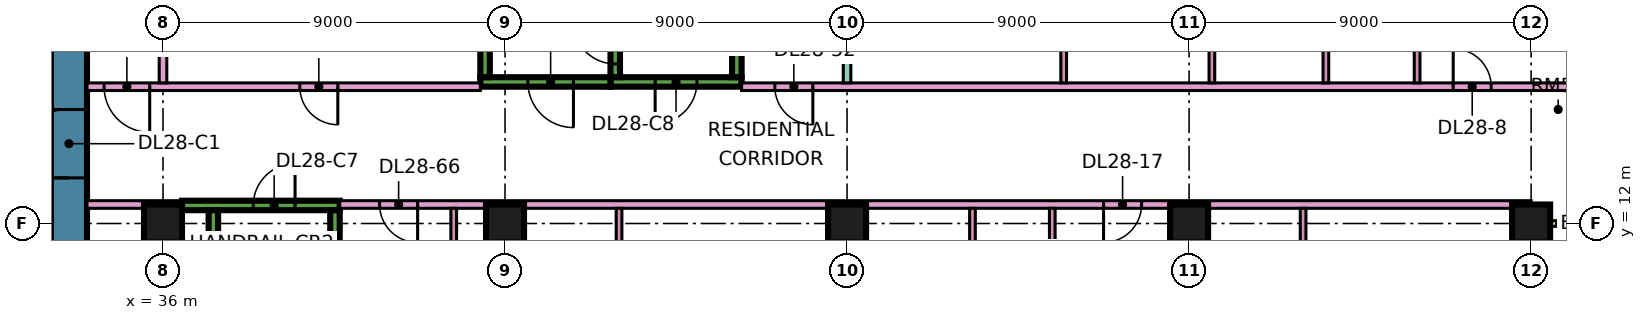
"""IFC4 building model, lengths in metres.
Left out: names, types, materials, properties, quantities, classifications, styles, units other than length and angle.
Written with IfcOpenShell. Run it as: python <this file> out.ifc"""

import sys

from ifc_helpers import new_model, si_unit, direction, frame, frame_2d, origin, origin_2d, place, context, subcontext, project, spatial, rectangle, extrude, element, fill, save


model = new_model("IFC4")
c1 = context("Model", 3, precision=1e-05, world=origin(), true_north=direction((0.0, 1.0)))
c2 = subcontext(c1, "Body", "Model", "MODEL_VIEW")
j1 = project(units=[si_unit("LENGTHUNIT", "METRE"), si_unit("PLANEANGLEUNIT", "RADIAN")], contexts=[c1])
p1 = place(None, origin())
s1 = spatial("IfcSite", under=j1, at=p1, CompositionType="ELEMENT")
p2 = place(p1, origin())
s2 = spatial("IfcBuilding", under=s1, at=p2, CompositionType="ELEMENT")
p3 = place(p2, frame((0.0, 0.0, 121.9)))
s3 = spatial("IfcBuildingStorey", under=s2, at=p3, CompositionType="ELEMENT", Elevation=121.9)
for number, where, z_axis, x_axis in (
    (1, (36.0, 12.0, 0.0), (0.0, 0.0, 1.0), (1.0, 0.0, 0.0)),
    (2, (45.0, 12.0, 0.0), (0.0, 0.0, 1.0), (1.0, 0.0, 0.0)),
    (3, (54.0, 12.0, 0.0), (0.0, 0.0, 1.0), (1.0, 0.0, 0.0)),
    (4, (63.0, 12.0, 0.0), (0.0, 0.0, 1.0), (1.0, 0.0, 0.0)),
    (5, (72.0, 12.0, 0.0), (0.0, 0.0, 1.0), (1.0, 0.0, 0.0)),
):
    element("IfcColumn", number, at=place(p3, frame(where, z_axis=z_axis, x_axis=x_axis)), inside=s3, PredefinedType="COLUMN", context=c2, shape_type="SweptSolid", body=[
        extrude(rectangle(XDim=1.0, YDim=1.0, at=origin_2d()), origin(), (0.0, 0.0, 1.0), 3.75),
    ])
p4 = place(p3, frame((33.525, 7.95, 0.0), z_axis=(0.0, 0.0, 1.0), x_axis=(0.0, 1.0, 0.0)))
e6 = element("IfcWall", 6, at=p4, inside=s3, PredefinedType="SHEAR", context=c2, shape_type="SweptSolid", body=[
    extrude(rectangle(XDim=11.1, YDim=0.95, at=frame_2d((5.55, 0.0))), origin(), (0.0, 0.0, 1.0), 3.75),
])
p5 = place(p4, frame((5.25, 0.0, 0.0)))
e7 = element("IfcOpeningElement", 7, at=p5, cuts=e6, PredefinedType="OPENING", context=c2, shape_type="SweptSolid", body=[
    extrude(rectangle(XDim=1.8, YDim=2.4, at=frame_2d((0.9, 1.2))), frame((0.0, 0.485, 0.0), z_axis=(0.0, -1.0, 0.0), x_axis=(1.0, 0.0, 0.0)), (0.0, 0.0, 1.0), 0.97),
])
p6 = place(p3, frame((36.5, 12.475, 0.0), z_axis=(0.0, 0.0, 1.0), x_axis=(1.0, 0.0, 0.0)))
e8 = element("IfcWall", 8, at=p6, inside=s3, PredefinedType="SHEAR", context=c2, shape_type="SweptSolid", body=[
    extrude(rectangle(XDim=4.15, YDim=0.25, at=frame_2d((2.075, 0.0))), origin(), (0.0, 0.0, 1.0), 3.75),
])
p7 = place(p6, frame((1.875, 0.0, 0.0)))
e9 = element("IfcOpeningElement", 9, at=p7, cuts=e8, PredefinedType="OPENING", context=c2, shape_type="SweptSolid", body=[
    extrude(rectangle(XDim=1.1, YDim=2.2, at=frame_2d((0.55, 1.1))), frame((0.0, 0.135, 0.0), z_axis=(0.0, -1.0, 0.0), x_axis=(1.0, 0.0, 0.0)), (0.0, 0.0, 1.0), 0.27),
])
for number, where, z_axis, x_axis in (
    (10, (37.325, 5.85, 0.0), (0.0, 0.0, 1.0), (0.0, 1.0, 0.0)),
    (11, (40.525, 5.85, 0.0), (0.0, 0.0, 1.0), (0.0, 1.0, 0.0)),
):
    element("IfcWall", number, at=place(p3, frame(where, z_axis=z_axis, x_axis=x_axis)), inside=s3, PredefinedType="SHEAR", context=c2, shape_type="SweptSolid", body=[
        extrude(rectangle(XDim=6.5, YDim=0.25, at=frame_2d((3.25, 0.0))), origin(), (0.0, 0.0, 1.0), 3.75),
    ])
p8 = place(p3, frame((47.775, 15.725, 0.0), z_axis=(0.0, 0.0, 1.0), x_axis=(1.0, 0.0, 0.0)))
e12 = element("IfcWall", 12, at=p8, inside=s3, PredefinedType="SHEAR", context=c2, shape_type="SweptSolid", body=[
    extrude(rectangle(XDim=3.45, YDim=0.25, at=frame_2d((1.725, 0.0))), origin(), (0.0, 0.0, 1.0), 3.75),
])
p9 = place(p8, frame((1.175, 0.0, 0.0)))
e13 = element("IfcOpeningElement", 13, at=p9, cuts=e12, PredefinedType="OPENING", context=c2, shape_type="SweptSolid", body=[
    extrude(rectangle(XDim=1.1, YDim=2.2, at=frame_2d((0.55, 1.1))), frame((0.0, 0.135, 0.0), z_axis=(0.0, -1.0, 0.0), x_axis=(1.0, 0.0, 0.0)), (0.0, 0.0, 1.0), 0.27),
])
p10 = place(p3, frame((47.9, 15.85, 0.0), z_axis=(0.0, 0.0, 1.0), x_axis=(0.0, 1.0, 0.0)))
e14 = element("IfcWall", 14, at=p10, inside=s3, PredefinedType="SHEAR", context=c2, shape_type="SweptSolid", body=[
    extrude(rectangle(XDim=6.5, YDim=0.25, at=frame_2d((3.25, 0.0))), origin(), (0.0, 0.0, 1.0), 3.75),
])
p11 = place(p10, frame((0.35, 0.0, 0.0)))
e15 = element("IfcOpeningElement", 15, at=p11, cuts=e14, PredefinedType="OPENING", context=c2, shape_type="SweptSolid", body=[
    extrude(rectangle(XDim=1.1, YDim=2.2, at=frame_2d((0.55, 1.1))), frame((0.0, 0.135, 0.0), z_axis=(0.0, -1.0, 0.0), x_axis=(1.0, 0.0, 0.0)), (0.0, 0.0, 1.0), 0.27),
])
p12 = place(p3, frame((51.1, 15.85, 0.0), z_axis=(0.0, 0.0, 1.0), x_axis=(0.0, 1.0, 0.0)))
e16 = element("IfcWall", 16, at=p12, inside=s3, PredefinedType="SHEAR", context=c2, shape_type="SweptSolid", body=[
    extrude(rectangle(XDim=6.5, YDim=0.25, at=frame_2d((3.25, 0.0))), origin(), (0.0, 0.0, 1.0), 3.75),
])
p13 = place(p3, frame((44.35, 15.725, 0.0), z_axis=(0.0, 0.0, 1.0), x_axis=(1.0, 0.0, 0.0)))
e17 = element("IfcWall", 17, at=p13, inside=s3, PredefinedType="SHEAR", context=c2, shape_type="SweptSolid", body=[
    extrude(rectangle(XDim=3.425, YDim=0.25, at=frame_2d((1.712, 0.0))), origin(), (0.0, 0.0, 1.0), 3.75),
])
p14 = place(p13, frame((1.25, 0.0, 0.0)))
e18 = element("IfcOpeningElement", 18, at=p14, cuts=e17, PredefinedType="OPENING", context=c2, shape_type="SweptSolid", body=[
    extrude(rectangle(XDim=1.2, YDim=2.2, at=frame_2d((0.6, 1.1))), frame((0.0, 0.135, 0.0), z_axis=(0.0, -1.0, 0.0), x_axis=(1.0, 0.0, 0.0)), (0.0, 0.0, 1.0), 0.27),
])
p15 = place(p3, frame((44.475, 15.85, 0.0), z_axis=(0.0, 0.0, 1.0), x_axis=(0.0, 1.0, 0.0)))
e19 = element("IfcWall", 19, at=p15, inside=s3, PredefinedType="SHEAR", context=c2, shape_type="SweptSolid", body=[
    extrude(rectangle(XDim=6.5, YDim=0.25, at=frame_2d((3.25, 0.0))), origin(), (0.0, 0.0, 1.0), 3.75),
])
p16 = place(p15, frame((1.75, 0.0, 0.0)))
e20 = element("IfcOpeningElement", 20, at=p16, cuts=e19, PredefinedType="OPENING", context=c2, shape_type="SweptSolid", body=[
    extrude(rectangle(XDim=1.1, YDim=2.2, at=frame_2d((0.55, 1.1))), frame((0.0, 0.135, 0.0), z_axis=(0.0, -1.0, 0.0), x_axis=(1.0, 0.0, 0.0)), (0.0, 0.0, 1.0), 0.27),
])
p17 = place(p15, frame((4.3, 0.0, 0.0)))
e21 = element("IfcOpeningElement", 21, at=p17, cuts=e19, PredefinedType="OPENING", context=c2, shape_type="SweptSolid", body=[
    extrude(rectangle(XDim=1.1, YDim=2.2, at=frame_2d((0.55, 1.1))), frame((0.0, 0.135, 0.0), z_axis=(0.0, -1.0, 0.0), x_axis=(1.0, 0.0, 0.0)), (0.0, 0.0, 1.0), 0.27),
])
p18 = place(p3, frame((72.0, 1.575, 0.0), z_axis=(0.0, 0.0, 1.0), x_axis=(0.0, 1.0, 0.0)))
e22 = element("IfcWall", 22, at=p18, inside=s3, PredefinedType="SOLIDWALL", context=c2, shape_type="SweptSolid", body=[
    extrude(rectangle(XDim=10.35, YDim=0.15, at=frame_2d((5.175, 0.0))), origin(), (0.0, 0.0, 1.0), 3.35),
])
p19 = place(p18, frame((1.562, 0.0, 0.0)))
e23 = element("IfcOpeningElement", 23, at=p19, cuts=e22, PredefinedType="OPENING", context=c2, shape_type="SweptSolid", body=[
    extrude(rectangle(XDim=1.8, YDim=2.4, at=frame_2d((0.9, 1.2))), frame((0.0, 0.085, 0.0), z_axis=(0.0, -1.0, 0.0), x_axis=(1.0, 0.0, 0.0)), (0.0, 0.0, 1.0), 0.17),
])
p20 = place(p18, frame((6.475, 0.0, 0.45)))
e24 = element("IfcOpeningElement", 24, at=p20, cuts=e22, PredefinedType="OPENING", context=c2, shape_type="SweptSolid", body=[
    extrude(rectangle(XDim=3.0, YDim=2.4, at=frame_2d((1.5, 1.2))), frame((0.0, 0.085, 0.0), z_axis=(0.0, -1.0, 0.0), x_axis=(1.0, 0.0, 0.0)), (0.0, 0.0, 1.0), 0.17),
])
p21 = place(p3, frame((73.5, 12.0, 0.0), z_axis=(0.0, 0.0, 1.0), x_axis=(-1.0, 0.0, 0.0)))
e25 = element("IfcWall", 25, at=p21, inside=s3, PredefinedType="SOLIDWALL", context=c2, shape_type="SweptSolid", body=[
    extrude(rectangle(XDim=1.5, YDim=0.15, at=frame_2d((0.75, 0.0))), origin(), (0.0, 0.0, 1.0), 3.35),
])
p22 = place(p3, frame((34.0, 12.5, 0.0), z_axis=(0.0, 0.0, 1.0), x_axis=(1.0, 0.0, 0.0)))
e26 = element("IfcWall", 26, at=p22, inside=s3, PredefinedType="PARTITIONING", context=c2, shape_type="SweptSolid", body=[
    extrude(rectangle(XDim=2.501, YDim=0.2, at=frame_2d((1.25, 0.0))), origin(), (0.0, 0.0, 1.0), 3.35),
])
p23 = place(p3, frame((34.0, 15.6, 0.0), z_axis=(0.0, 0.0, 1.0), x_axis=(1.0, 0.0, 0.0)))
e27 = element("IfcWall", 27, at=p23, inside=s3, PredefinedType="PARTITIONING", context=c2, shape_type="SweptSolid", body=[
    extrude(rectangle(XDim=10.35, YDim=0.2, at=frame_2d((5.175, 0.0))), origin(), (0.0, 0.0, 1.0), 3.35),
])
p24 = place(p23, frame((5.6, 0.0, 0.0)))
e28 = element("IfcOpeningElement", 28, at=p24, cuts=e27, PredefinedType="OPENING", context=c2, shape_type="SweptSolid", body=[
    extrude(rectangle(XDim=1.0, YDim=2.1, at=frame_2d((0.5, 1.05))), frame((0.0, 0.11, 0.0), z_axis=(0.0, -1.0, 0.0), x_axis=(1.0, 0.0, 0.0)), (0.0, 0.0, 1.0), 0.22),
])
p25 = place(p23, frame((0.45, 0.0, 0.0)))
e29 = element("IfcOpeningElement", 29, at=p25, cuts=e27, PredefinedType="OPENING", context=c2, shape_type="SweptSolid", body=[
    extrude(rectangle(XDim=1.2, YDim=2.1, at=frame_2d((0.6, 1.05))), frame((0.0, 0.11, 0.0), z_axis=(0.0, -1.0, 0.0), x_axis=(1.0, 0.0, 0.0)), (0.0, 0.0, 1.0), 0.22),
])
p26 = place(p3, frame((36.0, 15.7, 0.0), z_axis=(0.0, 0.0, 1.0), x_axis=(0.0, 1.0, 0.0)))
e30 = element("IfcWall", 30, at=p26, inside=s3, PredefinedType="PARTITIONING", context=c2, shape_type="SweptSolid", body=[
    extrude(rectangle(XDim=8.3, YDim=0.2, at=frame_2d((4.15, 0.0))), origin(), (0.0, 0.0, 1.0), 3.35),
])
p27 = place(p3, frame((40.65, 12.5, 0.0), z_axis=(0.0, 0.0, 1.0), x_axis=(1.0, 0.0, 0.0)))
e31 = element("IfcWall", 31, at=p27, inside=s3, PredefinedType="PARTITIONING", context=c2, shape_type="SweptSolid", body=[
    extrude(rectangle(XDim=31.35, YDim=0.2, at=frame_2d((15.675, 0.0))), origin(), (0.0, 0.0, 1.0), 3.35),
])
p28 = place(p27, frame((20.1, 0.0, 0.0)))
e32 = element("IfcOpeningElement", 32, at=p28, cuts=e31, PredefinedType="OPENING", context=c2, shape_type="SweptSolid", body=[
    extrude(rectangle(XDim=1.0, YDim=2.1, at=frame_2d((0.5, 1.05))), frame((0.0, 0.11, 0.0), z_axis=(0.0, -1.0, 0.0), x_axis=(1.0, 0.0, 0.0)), (0.0, 0.0, 1.0), 0.22),
])
p29 = place(p27, frame((1.05, 0.0, 0.0)))
e33 = element("IfcOpeningElement", 33, at=p29, cuts=e31, PredefinedType="OPENING", context=c2, shape_type="SweptSolid", body=[
    extrude(rectangle(XDim=1.0, YDim=2.1, at=frame_2d((0.5, 1.05))), frame((0.0, 0.11, 0.0), z_axis=(0.0, -1.0, 0.0), x_axis=(1.0, 0.0, 0.0)), (0.0, 0.0, 1.0), 0.22),
])
p30 = place(p3, frame((43.65, 5.975, 0.0), z_axis=(0.0, 0.0, 1.0), x_axis=(0.0, 1.0, 0.0)))
e34 = element("IfcWall", 34, at=p30, inside=s3, PredefinedType="PARTITIONING", context=c2, shape_type="SweptSolid", body=[
    extrude(rectangle(XDim=6.425, YDim=0.15, at=frame_2d((3.212, 0.0))), origin(), (0.0, 0.0, 1.0), 3.35),
])
p31 = place(p30, frame((4.275, 0.0, 0.0)))
e35 = element("IfcOpeningElement", 35, at=p31, cuts=e34, PredefinedType="OPENING", context=c2, shape_type="SweptSolid", body=[
    extrude(rectangle(XDim=0.9, YDim=2.1, at=frame_2d((0.45, 1.05))), frame((0.0, 0.085, 0.0), z_axis=(0.0, -1.0, 0.0), x_axis=(1.0, 0.0, 0.0)), (0.0, 0.0, 1.0), 0.17),
])
p32 = place(p3, frame((48.0, 5.975, 0.0), z_axis=(0.0, 0.0, 1.0), x_axis=(0.0, 1.0, 0.0)))
e36 = element("IfcWall", 36, at=p32, inside=s3, PredefinedType="PARTITIONING", context=c2, shape_type="SweptSolid", body=[
    extrude(rectangle(XDim=6.425, YDim=0.15, at=frame_2d((3.212, 0.0))), origin(), (0.0, 0.0, 1.0), 3.35),
])
p33 = place(p3, frame((51.225, 15.6, 0.0), z_axis=(0.0, 0.0, 1.0), x_axis=(1.0, 0.0, 0.0)))
e37 = element("IfcWall", 37, at=p33, inside=s3, PredefinedType="PARTITIONING", context=c2, shape_type="SweptSolid", body=[
    extrude(rectangle(XDim=22.125, YDim=0.2, at=frame_2d((11.062, 0.0))), origin(), (0.0, 0.0, 1.0), 3.35),
])
p34 = place(p33, frame((18.725, 0.0, 0.0)))
e38 = element("IfcOpeningElement", 38, at=p34, cuts=e37, PredefinedType="OPENING", context=c2, shape_type="SweptSolid", body=[
    extrude(rectangle(XDim=1.0, YDim=2.1, at=frame_2d((0.5, 1.05))), frame((0.0, 0.11, 0.0), z_axis=(0.0, -1.0, 0.0), x_axis=(1.0, 0.0, 0.0)), (0.0, 0.0, 1.0), 0.22),
])
p35 = place(p33, frame((0.875, 0.0, 0.0)))
e39 = element("IfcOpeningElement", 39, at=p35, cuts=e37, PredefinedType="OPENING", context=c2, shape_type="SweptSolid", body=[
    extrude(rectangle(XDim=1.0, YDim=2.1, at=frame_2d((0.5, 1.05))), frame((0.0, 0.11, 0.0), z_axis=(0.0, -1.0, 0.0), x_axis=(1.0, 0.0, 0.0)), (0.0, 0.0, 1.0), 0.22),
])
p36 = place(p3, frame((54.0, 0.074, 0.0), z_axis=(0.0, 0.0, 1.0), x_axis=(0.0, 1.0, 0.0)))
e40 = element("IfcWall", 40, at=p36, inside=s3, PredefinedType="PARTITIONING", context=c2, shape_type="SweptSolid", body=[
    extrude(rectangle(XDim=12.326, YDim=0.2, at=frame_2d((6.163, 0.0))), origin(), (0.0, 0.0, 1.0), 3.35),
])
p37 = place(p3, frame((54.0, 15.7, 0.0), z_axis=(0.0, 0.0, 1.0), x_axis=(0.0, 1.0, 0.0)))
e41 = element("IfcWall", 41, at=p37, inside=s3, PredefinedType="PARTITIONING", context=c2, shape_type="SweptSolid", body=[
    extrude(rectangle(XDim=8.226, YDim=0.2, at=frame_2d((4.113, 0.0))), origin(), (0.0, 0.0, 1.0), 3.35),
])
p38 = place(p3, frame((57.3, 7.775, 0.0), z_axis=(0.0, 0.0, 1.0), x_axis=(0.0, 1.0, 0.0)))
e42 = element("IfcWall", 42, at=p38, inside=s3, PredefinedType="PARTITIONING", context=c2, shape_type="SweptSolid", body=[
    extrude(rectangle(XDim=4.625, YDim=0.15, at=frame_2d((2.312, 0.0))), origin(), (0.0, 0.0, 1.0), 3.35),
])
p39 = place(p3, frame((59.4, 7.775, 0.0), z_axis=(0.0, 0.0, 1.0), x_axis=(0.0, 1.0, 0.0)))
e43 = element("IfcWall", 43, at=p39, inside=s3, PredefinedType="PARTITIONING", context=c2, shape_type="SweptSolid", body=[
    extrude(rectangle(XDim=4.625, YDim=0.15, at=frame_2d((2.312, 0.0))), origin(), (0.0, 0.0, 1.0), 3.35),
])
p40 = place(p39, frame((1.975, 0.0, 0.0)))
e44 = element("IfcOpeningElement", 44, at=p40, cuts=e43, PredefinedType="OPENING", context=c2, shape_type="SweptSolid", body=[
    extrude(rectangle(XDim=0.8, YDim=2.1, at=frame_2d((0.4, 1.05))), frame((0.0, 0.085, 0.0), z_axis=(0.0, -1.0, 0.0), x_axis=(1.0, 0.0, 0.0)), (0.0, 0.0, 1.0), 0.17),
])
p41 = place(p3, frame((59.7, 15.7, 0.0), z_axis=(0.0, 0.0, 1.0), x_axis=(0.0, 1.0, 0.0)))
e45 = element("IfcWall", 45, at=p41, inside=s3, PredefinedType="PARTITIONING", context=c2, shape_type="SweptSolid", body=[
    extrude(rectangle(XDim=3.125, YDim=0.15, at=frame_2d((1.562, 0.0))), origin(), (0.0, 0.0, 1.0), 3.35),
])
p42 = place(p3, frame((63.0, 7.775, 0.0), z_axis=(0.0, 0.0, 1.0), x_axis=(0.0, 1.0, 0.0)))
e46 = element("IfcWall", 46, at=p42, inside=s3, PredefinedType="PARTITIONING", context=c2, shape_type="SweptSolid", body=[
    extrude(rectangle(XDim=4.625, YDim=0.15, at=frame_2d((2.312, 0.0))), origin(), (0.0, 0.0, 1.0), 3.35),
])
p43 = place(p3, frame((63.6, 15.7, 0.0), z_axis=(0.0, 0.0, 1.0), x_axis=(0.0, 1.0, 0.0)))
e47 = element("IfcWall", 47, at=p43, inside=s3, PredefinedType="PARTITIONING", context=c2, shape_type="SweptSolid", body=[
    extrude(rectangle(XDim=3.125, YDim=0.15, at=frame_2d((1.562, 0.0))), origin(), (0.0, 0.0, 1.0), 3.35),
])
p44 = place(p3, frame((66.0, 7.775, 0.0), z_axis=(0.0, 0.0, 1.0), x_axis=(0.0, 1.0, 0.0)))
e48 = element("IfcWall", 48, at=p44, inside=s3, PredefinedType="PARTITIONING", context=c2, shape_type="SweptSolid", body=[
    extrude(rectangle(XDim=4.625, YDim=0.15, at=frame_2d((2.312, 0.0))), origin(), (0.0, 0.0, 1.0), 3.35),
])
p45 = place(p3, frame((66.6, 15.7, 0.0), z_axis=(0.0, 0.0, 1.0), x_axis=(0.0, 1.0, 0.0)))
e49 = element("IfcWall", 49, at=p45, inside=s3, PredefinedType="PARTITIONING", context=c2, shape_type="SweptSolid", body=[
    extrude(rectangle(XDim=3.125, YDim=0.15, at=frame_2d((1.562, 0.0))), origin(), (0.0, 0.0, 1.0), 3.35),
])
p46 = place(p3, frame((69.0, 15.7, 0.0), z_axis=(0.0, 0.0, 1.0), x_axis=(0.0, 1.0, 0.0)))
e50 = element("IfcWall", 50, at=p46, inside=s3, PredefinedType="PARTITIONING", context=c2, shape_type="SweptSolid", body=[
    extrude(rectangle(XDim=3.125, YDim=0.15, at=frame_2d((1.562, 0.0))), origin(), (0.0, 0.0, 1.0), 3.35),
])
p47 = place(p46, frame((1.2, 0.0, 0.0)))
e51 = element("IfcOpeningElement", 51, at=p47, cuts=e50, PredefinedType="OPENING", context=c2, shape_type="SweptSolid", body=[
    extrude(rectangle(XDim=0.8, YDim=2.1, at=frame_2d((0.4, 1.05))), frame((0.0, 0.085, 0.0), z_axis=(0.0, -1.0, 0.0), x_axis=(1.0, 0.0, 0.0)), (0.0, 0.0, 1.0), 0.17),
])
p48 = place(p5, origin())
e52 = element("IfcDoor", 52, at=p48, inside=s3, OperationType="DOUBLE_DOOR_SINGLE_SWING", PredefinedType="DOOR", context=c2, shape_type="SweptSolid", body=[
    extrude(rectangle(XDim=1.8, YDim=2.4, at=frame_2d((0.9, 1.2))), frame((0.0, 0.025, 0.0), z_axis=(0.0, -1.0, 0.0), x_axis=(1.0, 0.0, 0.0)), (0.0, 0.0, 1.0), 0.05),
])
fill(e7, e52)
p49 = place(p7, frame((1.1, 0.0, 0.0), z_axis=(0.0, 0.0, 1.0), x_axis=(-1.0, 0.0, 0.0)))
e53 = element("IfcDoor", 53, at=p49, inside=s3, OperationType="SINGLE_SWING_RIGHT", PredefinedType="DOOR", context=c2, shape_type="SweptSolid", body=[
    extrude(rectangle(XDim=1.1, YDim=2.2, at=frame_2d((0.55, 1.1))), frame((0.0, 0.025, 0.0), z_axis=(0.0, -1.0, 0.0), x_axis=(1.0, 0.0, 0.0)), (0.0, 0.0, 1.0), 0.05),
])
fill(e9, e53)
p50 = place(p9, frame((1.1, 0.0, 0.0), z_axis=(0.0, 0.0, 1.0), x_axis=(-1.0, 0.0, 0.0)))
e54 = element("IfcDoor", 54, at=p50, inside=s3, OperationType="SINGLE_SWING_LEFT", PredefinedType="DOOR", context=c2, shape_type="SweptSolid", body=[
    extrude(rectangle(XDim=1.1, YDim=2.2, at=frame_2d((0.55, 1.1))), frame((0.0, 0.025, 0.0), z_axis=(0.0, -1.0, 0.0), x_axis=(1.0, 0.0, 0.0)), (0.0, 0.0, 1.0), 0.05),
])
fill(e13, e54)
p51 = place(p14, origin())
e55 = element("IfcDoor", 55, at=p51, inside=s3, OperationType="SINGLE_SWING_RIGHT", PredefinedType="DOOR", context=c2, shape_type="SweptSolid", body=[
    extrude(rectangle(XDim=1.2, YDim=2.2, at=frame_2d((0.6, 1.1))), frame((0.0, 0.025, 0.0), z_axis=(0.0, -1.0, 0.0), x_axis=(1.0, 0.0, 0.0)), (0.0, 0.0, 1.0), 0.05),
])
fill(e18, e55)
p52 = place(p11, frame((1.1, 0.0, 0.0), z_axis=(0.0, 0.0, 1.0), x_axis=(-1.0, 0.0, 0.0)))
e56 = element("IfcDoor", 56, at=p52, inside=s3, OperationType="SINGLE_SWING_RIGHT", PredefinedType="DOOR", context=c2, shape_type="SweptSolid", body=[
    extrude(rectangle(XDim=1.1, YDim=2.2, at=frame_2d((0.55, 1.1))), frame((0.0, 0.025, 0.0), z_axis=(0.0, -1.0, 0.0), x_axis=(1.0, 0.0, 0.0)), (0.0, 0.0, 1.0), 0.05),
])
fill(e15, e56)
p53 = place(p24, origin())
e57 = element("IfcDoor", 57, at=p53, inside=s3, OperationType="SINGLE_SWING_RIGHT", PredefinedType="DOOR", context=c2, shape_type="SweptSolid", body=[
    extrude(rectangle(XDim=1.0, YDim=2.1, at=frame_2d((0.5, 1.05))), frame((0.0, 0.025, 0.0), z_axis=(0.0, -1.0, 0.0), x_axis=(1.0, 0.0, 0.0)), (0.0, 0.0, 1.0), 0.05),
])
fill(e28, e57)
p54 = place(p34, origin())
e58 = element("IfcDoor", 58, at=p54, inside=s3, OperationType="SINGLE_SWING_LEFT", PredefinedType="DOOR", context=c2, shape_type="SweptSolid", body=[
    extrude(rectangle(XDim=1.0, YDim=2.1, at=frame_2d((0.5, 1.05))), frame((0.0, 0.025, 0.0), z_axis=(0.0, -1.0, 0.0), x_axis=(1.0, 0.0, 0.0)), (0.0, 0.0, 1.0), 0.05),
])
fill(e38, e58)
p55 = place(p28, frame((1.0, 0.0, 0.0), z_axis=(0.0, 0.0, 1.0), x_axis=(-1.0, 0.0, 0.0)))
e59 = element("IfcDoor", 59, at=p55, inside=s3, OperationType="SINGLE_SWING_LEFT", PredefinedType="DOOR", context=c2, shape_type="SweptSolid", body=[
    extrude(rectangle(XDim=1.0, YDim=2.1, at=frame_2d((0.5, 1.05))), frame((0.0, 0.025, 0.0), z_axis=(0.0, -1.0, 0.0), x_axis=(1.0, 0.0, 0.0)), (0.0, 0.0, 1.0), 0.05),
])
fill(e32, e59)
p56 = place(p25, origin())
e60 = element("IfcDoor", 60, at=p56, inside=s3, OperationType="SINGLE_SWING_RIGHT", PredefinedType="DOOR", context=c2, shape_type="SweptSolid", body=[
    extrude(rectangle(XDim=1.2, YDim=2.1, at=frame_2d((0.6, 1.05))), frame((0.0, 0.025, 0.0), z_axis=(0.0, -1.0, 0.0), x_axis=(1.0, 0.0, 0.0)), (0.0, 0.0, 1.0), 0.05),
])
fill(e29, e60)
p57 = place(p35, origin())
e61 = element("IfcDoor", 61, at=p57, inside=s3, OperationType="SINGLE_SWING_RIGHT", PredefinedType="DOOR", context=c2, shape_type="SweptSolid", body=[
    extrude(rectangle(XDim=1.0, YDim=2.1, at=frame_2d((0.5, 1.05))), frame((0.0, 0.025, 0.0), z_axis=(0.0, -1.0, 0.0), x_axis=(1.0, 0.0, 0.0)), (0.0, 0.0, 1.0), 0.05),
])
fill(e39, e61)
p58 = place(p29, origin())
e62 = element("IfcDoor", 62, at=p58, inside=s3, OperationType="SINGLE_SWING_RIGHT", PredefinedType="DOOR", context=c2, shape_type="SweptSolid", body=[
    extrude(rectangle(XDim=1.0, YDim=2.1, at=frame_2d((0.5, 1.05))), frame((0.0, 0.025, 0.0), z_axis=(0.0, -1.0, 0.0), x_axis=(1.0, 0.0, 0.0)), (0.0, 0.0, 1.0), 0.05),
])
fill(e33, e62)
save(model, sys.argv[1])
